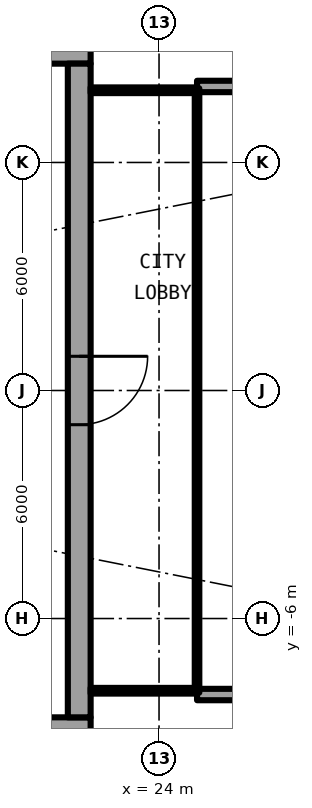
"""IFC4 building model, lengths in metres.
Left out: names, types, materials, properties, quantities, classifications, styles, units other than length and angle.
Written with IfcOpenShell. Run it as: python <this file> out.ifc"""

import sys

from ifc_helpers import new_model, si_unit, direction, frame, frame_2d, origin, place, context, subcontext, project, spatial, rectangle, extrude, element, fill, save


model = new_model("IFC4")
c1 = context("Model", 3, precision=1e-05, world=origin(), true_north=direction((0.0, 1.0)))
c2 = subcontext(c1, "Body", "Model", "MODEL_VIEW")
j1 = project(units=[si_unit("LENGTHUNIT", "METRE"), si_unit("PLANEANGLEUNIT", "RADIAN")], contexts=[c1])
p1 = place(None, origin())
s1 = spatial("IfcSite", under=j1, at=p1, CompositionType="ELEMENT")
p2 = place(p1, origin())
s2 = spatial("IfcBuilding", under=s1, at=p2, CompositionType="ELEMENT")
p3 = place(p2, frame((0.0, 0.0, 129.95)))
s3 = spatial("IfcBuildingStorey", under=s2, at=p3, CompositionType="ELEMENT", Elevation=129.95)
for number, where, z_axis, x_axis in (
    (1, (25.0, 8.0, 0.0), (0.0, 0.0, 1.0), (1.0, 0.0, 0.0)),
    (2, (25.0, -8.0, 0.0), (0.0, 0.0, 1.0), (1.0, 0.0, 0.0)),
):
    element("IfcWall", number, at=place(p3, frame(where, z_axis=z_axis, x_axis=x_axis)), inside=s3, PredefinedType="SOLIDWALL", context=c2, shape_type="SweptSolid", body=[
        extrude(rectangle(XDim=2.667, YDim=0.3, at=frame_2d((1.333, 0.0))), origin(), (0.0, 0.0, 1.0), 2.7),
    ])
p4 = place(p3, frame((22.2, 8.9, 0.0), z_axis=(0.0, 0.0, 1.0), x_axis=(-1.0, 0.0, 0.0)))
e3 = element("IfcWall", 3, at=p4, inside=s3, PredefinedType="SHEAR", context=c2, shape_type="SweptSolid", body=[
    extrude(rectangle(XDim=13.8, YDim=0.6, at=frame_2d((6.9, 0.0))), origin(), (0.0, 0.0, 1.0), 3.05),
])
p5 = place(p4, frame((1.125, 0.0, 0.0)))
e4 = element("IfcOpeningElement", 4, at=p5, cuts=e3, PredefinedType="OPENING", context=c2, shape_type="SweptSolid", body=[
    extrude(rectangle(XDim=1.2, YDim=2.3, at=frame_2d((0.6, 1.15))), frame((0.0, 0.31, 0.0), z_axis=(0.0, -1.0, 0.0), x_axis=(1.0, 0.0, 0.0)), (0.0, 0.0, 1.0), 0.62),
])
p6 = place(p3, frame((8.4, -8.9, 0.0), z_axis=(0.0, 0.0, 1.0), x_axis=(1.0, 0.0, 0.0)))
e5 = element("IfcWall", 5, at=p6, inside=s3, PredefinedType="SHEAR", context=c2, shape_type="SweptSolid", body=[
    extrude(rectangle(XDim=13.8, YDim=0.6, at=frame_2d((6.9, 0.0))), origin(), (0.0, 0.0, 1.0), 3.05),
])
p7 = place(p6, frame((11.475, 0.0, 0.0)))
e6 = element("IfcOpeningElement", 6, at=p7, cuts=e5, PredefinedType="OPENING", context=c2, shape_type="SweptSolid", body=[
    extrude(rectangle(XDim=1.2, YDim=2.3, at=frame_2d((0.6, 1.15))), frame((0.0, 0.31, 0.0), z_axis=(0.0, -1.0, 0.0), x_axis=(1.0, 0.0, 0.0)), (0.0, 0.0, 1.0), 0.62),
])
p8 = place(p3, frame((21.9, 8.6, 0.0), z_axis=(0.0, 0.0, 1.0), x_axis=(0.0, -1.0, 0.0)))
e7 = element("IfcWall", 7, at=p8, inside=s3, PredefinedType="SHEAR", context=c2, shape_type="SweptSolid", body=[
    extrude(rectangle(XDim=17.2, YDim=0.6, at=frame_2d((8.6, 0.0))), origin(), (0.0, 0.0, 1.0), 3.05),
])
p9 = place(p8, frame((7.7, 0.0, 0.0)))
e8 = element("IfcOpeningElement", 8, at=p9, cuts=e7, PredefinedType="OPENING", context=c2, shape_type="SweptSolid", body=[
    extrude(rectangle(XDim=1.8, YDim=2.3, at=frame_2d((0.9, 1.15))), frame((0.0, 0.31, 0.0), z_axis=(0.0, -1.0, 0.0), x_axis=(1.0, 0.0, 0.0)), (0.0, 0.0, 1.0), 0.62),
])
for number, where, z_axis, x_axis in (
    (9, (22.2, -7.9, 0.0), (0.0, 0.0, 1.0), (1.0, 0.0, 0.0)),
    (10, (22.2, 7.9, 0.0), (0.0, 0.0, 1.0), (1.0, 0.0, 0.0)),
):
    element("IfcWall", number, at=place(p3, frame(where, z_axis=z_axis, x_axis=x_axis)), inside=s3, PredefinedType="PARTITIONING", context=c2, shape_type="SweptSolid", body=[
        extrude(rectangle(XDim=2.74, YDim=0.15, at=frame_2d((1.37, 0.0))), origin(), (0.0, 0.0, 1.0), 2.7),
    ])
p10 = place(p3, frame((25.0, -7.95, 0.0), z_axis=(0.0, 0.0, 1.0), x_axis=(0.0, 1.0, 0.0)))
e11 = element("IfcWall", 11, at=p10, inside=s3, PredefinedType="PARTITIONING", context=c2, shape_type="SweptSolid", body=[
    extrude(rectangle(XDim=15.9, YDim=0.12, at=frame_2d((7.95, 0.0))), origin(), (0.0, 0.0, 1.0), 2.7),
])
p11 = place(p10, frame((0.95, 0.0, 0.1)))
e12 = element("IfcOpeningElement", 12, at=p11, cuts=e11, PredefinedType="OPENING", context=c2, shape_type="SweptSolid", body=[
    extrude(rectangle(XDim=14.0, YDim=2.35, at=frame_2d((7.0, 1.175))), frame((0.0, 0.07, 0.0), z_axis=(0.0, -1.0, 0.0), x_axis=(1.0, 0.0, 0.0)), (0.0, 0.0, 1.0), 0.14),
])
p12 = place(p9, origin())
e13 = element("IfcDoor", 13, at=p12, inside=s3, OperationType="SINGLE_SWING_LEFT", PredefinedType="DOOR", context=c2, shape_type="SweptSolid", body=[
    extrude(rectangle(XDim=1.8, YDim=2.3, at=frame_2d((0.9, 1.15))), frame((0.0, 0.025, 0.0), z_axis=(0.0, -1.0, 0.0), x_axis=(1.0, 0.0, 0.0)), (0.0, 0.0, 1.0), 0.05),
])
fill(e8, e13)
p13 = place(p11, origin())
e14 = element("IfcWindow", 14, at=p13, inside=s3, PartitioningType="SINGLE_PANEL", PredefinedType="WINDOW", context=c2, shape_type="SweptSolid", body=[
    extrude(rectangle(XDim=14.0, YDim=2.35, at=frame_2d((7.0, 1.175))), frame((0.0, 0.03, 0.0), z_axis=(0.0, -1.0, 0.0), x_axis=(1.0, 0.0, 0.0)), (0.0, 0.0, 1.0), 0.06),
])
fill(e12, e14)
save(model, sys.argv[1])
